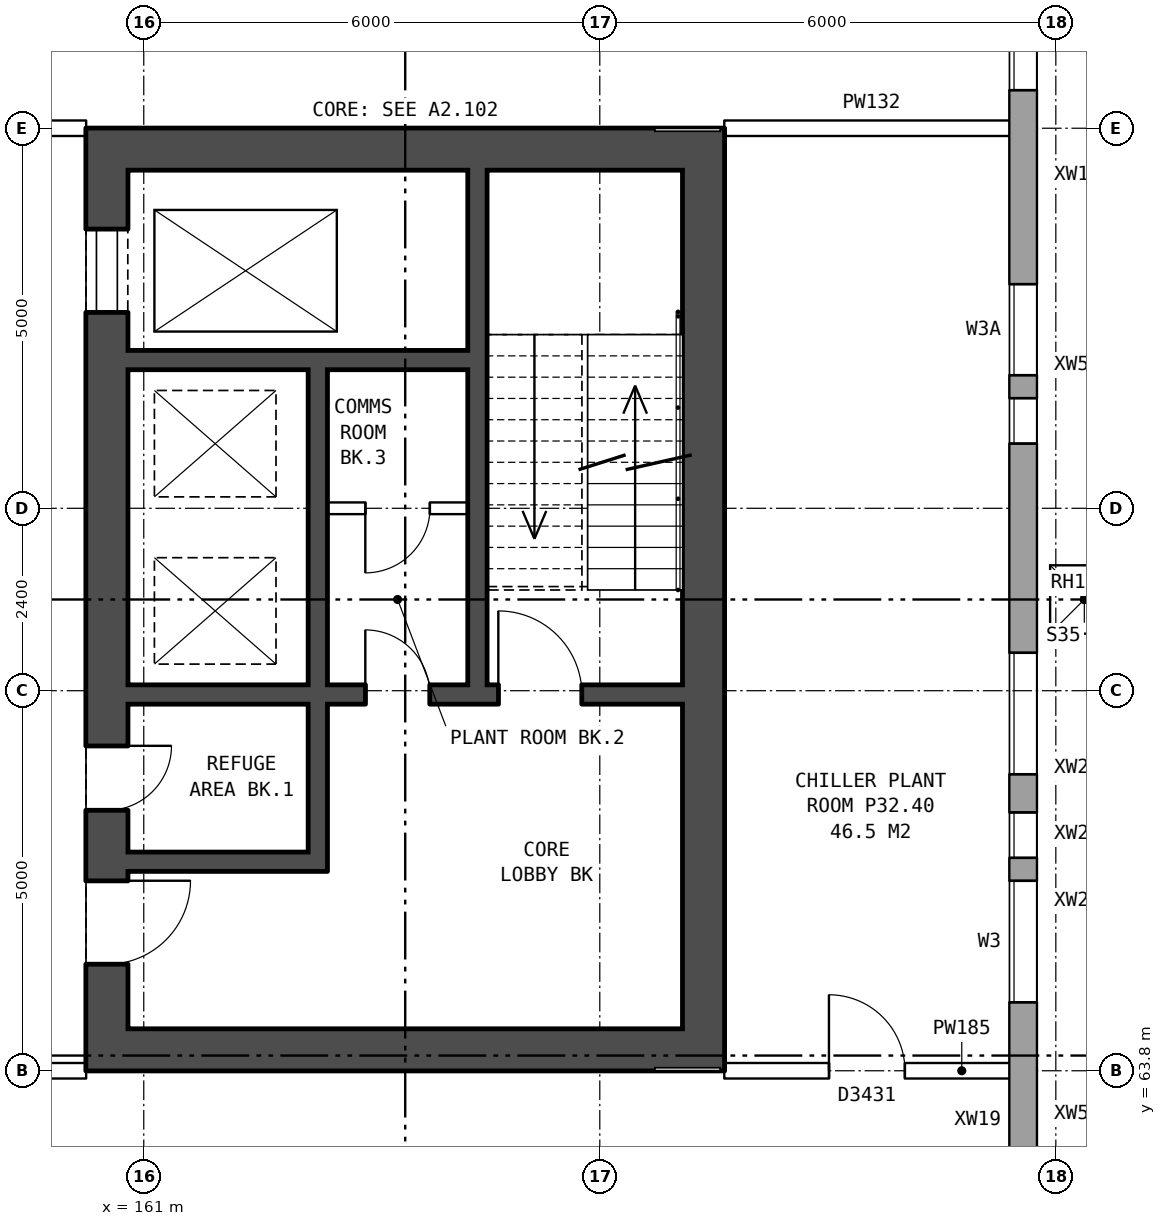
"""IFC4 building model, lengths in metres.
Left out: names, types, materials, properties, quantities, classifications, styles, units other than length and angle.
Written with IfcOpenShell. Run it as: python <this file> out.ifc"""

import sys

from ifc_helpers import new_model, si_unit, direction, frame, frame_2d, origin, origin_2d, place, context, subcontext, project, spatial, rectangle, extrude, element, fill, save


model = new_model("IFC4")
c1 = context("Model", 3, precision=1e-05, world=origin(), true_north=direction((0.0, 1.0)))
c2 = subcontext(c1, "Body", "Model", "MODEL_VIEW")
j1 = project(units=[si_unit("LENGTHUNIT", "METRE"), si_unit("PLANEANGLEUNIT", "RADIAN")], contexts=[c1])
p1 = place(None, origin())
s1 = spatial("IfcSite", under=j1, at=p1, CompositionType="ELEMENT")
p2 = place(p1, origin())
s2 = spatial("IfcBuilding", under=s1, at=p2, CompositionType="ELEMENT")
p3 = place(p2, frame((0.0, 0.0, 115.0)))
s3 = spatial("IfcBuildingStorey", under=s2, at=p3, CompositionType="ELEMENT", Elevation=115.0)
p4 = place(p3, frame((172.57, 57.075, 0.0), z_axis=(0.0, 0.0, 1.0), x_axis=(0.0, 1.0, 0.0)))
e1 = element("IfcWall", 1, at=p4, inside=s3, PredefinedType="STANDARD", context=c2, shape_type="SweptSolid", body=[
    extrude(rectangle(XDim=25.851, YDim=0.36, at=frame_2d((12.925, 0.0))), origin(), (0.0, 0.0, 1.0), 4.2),
])
p5 = place(p4, frame((2.6, 0.0, 1.5)))
e2 = element("IfcOpeningElement", 2, at=p5, cuts=e1, PredefinedType="OPENING", context=c2, shape_type="SweptSolid", body=[
    extrude(rectangle(XDim=0.9, YDim=1.2, at=frame_2d((0.45, 0.6))), frame((0.0, 0.19, 0.0), z_axis=(0.0, -1.0, 0.0), x_axis=(1.0, 0.0, 0.0)), (0.0, 0.0, 1.0), 0.38),
])
p6 = place(p4, frame((3.925, 0.0, 1.5)))
e3 = element("IfcOpeningElement", 3, at=p6, cuts=e1, PredefinedType="OPENING", context=c2, shape_type="SweptSolid", body=[
    extrude(rectangle(XDim=0.6, YDim=1.2, at=frame_2d((0.3, 0.6))), frame((0.0, 0.19, 0.0), z_axis=(0.0, -1.0, 0.0), x_axis=(1.0, 0.0, 0.0)), (0.0, 0.0, 1.0), 0.38),
])
p7 = place(p4, frame((7.625, 0.0, 1.5)))
e4 = element("IfcOpeningElement", 4, at=p7, cuts=e1, PredefinedType="OPENING", context=c2, shape_type="SweptSolid", body=[
    extrude(rectangle(XDim=1.6, YDim=1.2, at=frame_2d((0.8, 0.6))), frame((0.0, 0.19, 0.0), z_axis=(0.0, -1.0, 0.0), x_axis=(1.0, 0.0, 0.0)), (0.0, 0.0, 1.0), 0.38),
])
p8 = place(p4, frame((10.625, 0.0, 1.5)))
e5 = element("IfcOpeningElement", 5, at=p8, cuts=e1, PredefinedType="OPENING", context=c2, shape_type="SweptSolid", body=[
    extrude(rectangle(XDim=1.6, YDim=1.2, at=frame_2d((0.8, 0.6))), frame((0.0, 0.19, 0.0), z_axis=(0.0, -1.0, 0.0), x_axis=(1.0, 0.0, 0.0)), (0.0, 0.0, 1.0), 0.38),
])
p9 = place(p4, frame((9.525, 0.0, 1.5)))
e6 = element("IfcOpeningElement", 6, at=p9, cuts=e1, PredefinedType="OPENING", context=c2, shape_type="SweptSolid", body=[
    extrude(rectangle(XDim=0.6, YDim=1.2, at=frame_2d((0.3, 0.6))), frame((0.0, 0.19, 0.0), z_axis=(0.0, -1.0, 0.0), x_axis=(1.0, 0.0, 0.0)), (0.0, 0.0, 1.0), 0.38),
])
p10 = place(p4, frame((14.975, 0.0, 1.5)))
e7 = element("IfcOpeningElement", 7, at=p10, cuts=e1, PredefinedType="OPENING", context=c2, shape_type="SweptSolid", body=[
    extrude(rectangle(XDim=0.6, YDim=1.2, at=frame_2d((0.3, 0.6))), frame((0.0, 0.19, 0.0), z_axis=(0.0, -1.0, 0.0), x_axis=(1.0, 0.0, 0.0)), (0.0, 0.0, 1.0), 0.38),
])
p11 = place(p4, frame((19.625, 0.0, 1.5)))
e8 = element("IfcOpeningElement", 8, at=p11, cuts=e1, PredefinedType="OPENING", context=c2, shape_type="SweptSolid", body=[
    extrude(rectangle(XDim=1.6, YDim=1.2, at=frame_2d((0.8, 0.6))), frame((0.0, 0.19, 0.0), z_axis=(0.0, -1.0, 0.0), x_axis=(1.0, 0.0, 0.0)), (0.0, 0.0, 1.0), 0.38),
])
p12 = place(p4, frame((22.625, 0.0, 1.5)))
e9 = element("IfcOpeningElement", 9, at=p12, cuts=e1, PredefinedType="OPENING", context=c2, shape_type="SweptSolid", body=[
    extrude(rectangle(XDim=1.6, YDim=1.2, at=frame_2d((0.8, 0.6))), frame((0.0, 0.19, 0.0), z_axis=(0.0, -1.0, 0.0), x_axis=(1.0, 0.0, 0.0)), (0.0, 0.0, 1.0), 0.38),
])
p13 = place(p4, frame((15.875, 0.0, 1.5)))
e10 = element("IfcOpeningElement", 10, at=p13, cuts=e1, PredefinedType="OPENING", context=c2, shape_type="SweptSolid", body=[
    extrude(rectangle(XDim=1.2, YDim=1.2, at=frame_2d((0.6, 0.6))), frame((0.0, 0.19, 0.0), z_axis=(0.0, -1.0, 0.0), x_axis=(1.0, 0.0, 0.0)), (0.0, 0.0, 1.0), 0.38),
])
p14 = place(p3, frame((160.515, 76.2, 0.0), z_axis=(0.0, 0.0, 1.0), x_axis=(0.0, -1.0, 0.0)))
e11 = element("IfcWall", 11, at=p14, inside=s3, PredefinedType="SHEAR", context=c2, shape_type="SweptSolid", body=[
    extrude(rectangle(XDim=12.4, YDim=0.55, at=frame_2d((6.2, 0.0))), origin(), (0.0, 0.0, 1.0), 4.2),
])
p15 = place(p14, frame((1.325, 0.0, 0.0)))
e12 = element("IfcOpeningElement", 12, at=p15, cuts=e11, PredefinedType="OPENING", context=c2, shape_type="SweptSolid", body=[
    extrude(rectangle(XDim=1.1, YDim=2.1, at=frame_2d((0.55, 1.05))), frame((0.0, 0.285, 0.0), z_axis=(0.0, -1.0, 0.0), x_axis=(1.0, 0.0, 0.0)), (0.0, 0.0, 1.0), 0.57),
])
p16 = place(p14, frame((9.9, 0.0, 0.0)))
e13 = element("IfcOpeningElement", 13, at=p16, cuts=e11, PredefinedType="OPENING", context=c2, shape_type="SweptSolid", body=[
    extrude(rectangle(XDim=1.1, YDim=2.1, at=frame_2d((0.55, 1.05))), frame((0.0, 0.285, 0.0), z_axis=(0.0, -1.0, 0.0), x_axis=(1.0, 0.0, 0.0)), (0.0, 0.0, 1.0), 0.57),
])
p17 = place(p14, frame((8.125, 0.0, 0.0)))
e14 = element("IfcOpeningElement", 14, at=p17, cuts=e11, PredefinedType="OPENING", context=c2, shape_type="SweptSolid", body=[
    extrude(rectangle(XDim=0.85, YDim=2.1, at=frame_2d((0.425, 1.05))), frame((0.0, 0.285, 0.0), z_axis=(0.0, -1.0, 0.0), x_axis=(1.0, 0.0, 0.0)), (0.0, 0.0, 1.0), 0.57),
])
p18 = place(p3, frame((168.365, 76.2, 0.0), z_axis=(0.0, 0.0, 1.0), x_axis=(0.0, -1.0, 0.0)))
e15 = element("IfcWall", 15, at=p18, inside=s3, PredefinedType="SHEAR", context=c2, shape_type="SweptSolid", body=[
    extrude(rectangle(XDim=12.4, YDim=0.55, at=frame_2d((6.2, 0.0))), origin(), (0.0, 0.0, 1.0), 4.2),
])
for number, where, z_axis, x_axis in (
    (16, (160.79, 75.925, 0.0), (0.0, 0.0, 1.0), (1.0, 0.0, 0.0)),
    (17, (160.79, 64.075, 0.0), (0.0, 0.0, 1.0), (1.0, 0.0, 0.0)),
):
    element("IfcWall", number, at=place(p3, frame(where, z_axis=z_axis, x_axis=x_axis)), inside=s3, PredefinedType="SHEAR", context=c2, shape_type="SweptSolid", body=[
        extrude(rectangle(XDim=7.3, YDim=0.55, at=frame_2d((3.65, 0.0))), origin(), (0.0, 0.0, 1.0), 4.2),
    ])
p19 = place(p3, frame((160.79, 73.15, 0.0), z_axis=(0.0, 0.0, 1.0), x_axis=(1.0, 0.0, 0.0)))
e18 = element("IfcWall", 18, at=p19, inside=s3, PredefinedType="SHEAR", context=c2, shape_type="SweptSolid", body=[
    extrude(rectangle(XDim=4.475, YDim=0.25, at=frame_2d((2.237, 0.0))), origin(), (0.0, 0.0, 1.0), 4.2),
])
p20 = place(p3, frame((163.415, 71.2, 0.0), z_axis=(0.0, 0.0, 1.0), x_axis=(1.0, 0.0, 0.0)))
e19 = element("IfcWall", 19, at=p20, inside=s3, PredefinedType="PARTITIONING", context=c2, shape_type="SweptSolid", body=[
    extrude(rectangle(XDim=1.85, YDim=0.15, at=frame_2d((0.925, 0.0))), origin(), (0.0, 0.0, 1.0), 4.2),
])
p21 = place(p20, frame((0.5, 0.0, 0.0)))
e20 = element("IfcOpeningElement", 20, at=p21, cuts=e19, PredefinedType="OPENING", context=c2, shape_type="SweptSolid", body=[
    extrude(rectangle(XDim=0.85, YDim=2.1, at=frame_2d((0.425, 1.05))), frame((0.0, 0.085, 0.0), z_axis=(0.0, -1.0, 0.0), x_axis=(1.0, 0.0, 0.0)), (0.0, 0.0, 1.0), 0.17),
])
p22 = place(p3, frame((160.79, 68.75, 0.0), z_axis=(0.0, 0.0, 1.0), x_axis=(1.0, 0.0, 0.0)))
e21 = element("IfcWall", 21, at=p22, inside=s3, PredefinedType="SHEAR", context=c2, shape_type="SweptSolid", body=[
    extrude(rectangle(XDim=7.3, YDim=0.25, at=frame_2d((3.65, 0.0))), origin(), (0.0, 0.0, 1.0), 4.2),
])
p23 = place(p22, frame((4.875, 0.0, 0.0)))
e22 = element("IfcOpeningElement", 22, at=p23, cuts=e21, PredefinedType="OPENING", context=c2, shape_type="SweptSolid", body=[
    extrude(rectangle(XDim=1.1, YDim=2.1, at=frame_2d((0.55, 1.05))), frame((0.0, 0.135, 0.0), z_axis=(0.0, -1.0, 0.0), x_axis=(1.0, 0.0, 0.0)), (0.0, 0.0, 1.0), 0.27),
])
p24 = place(p22, frame((3.125, 0.0, 0.0)))
e23 = element("IfcOpeningElement", 23, at=p24, cuts=e21, PredefinedType="OPENING", context=c2, shape_type="SweptSolid", body=[
    extrude(rectangle(XDim=0.85, YDim=2.1, at=frame_2d((0.425, 1.05))), frame((0.0, 0.135, 0.0), z_axis=(0.0, -1.0, 0.0), x_axis=(1.0, 0.0, 0.0)), (0.0, 0.0, 1.0), 0.27),
])
p25 = place(p3, frame((160.79, 66.55, 0.0), z_axis=(0.0, 0.0, 1.0), x_axis=(1.0, 0.0, 0.0)))
e24 = element("IfcWall", 24, at=p25, inside=s3, PredefinedType="SHEAR", context=c2, shape_type="SweptSolid", body=[
    extrude(rectangle(XDim=2.375, YDim=0.25, at=frame_2d((1.188, 0.0))), origin(), (0.0, 0.0, 1.0), 4.2),
])
p26 = place(p3, frame((163.29, 73.025, 0.0), z_axis=(0.0, 0.0, 1.0), x_axis=(0.0, -1.0, 0.0)))
e25 = element("IfcWall", 25, at=p26, inside=s3, PredefinedType="SHEAR", context=c2, shape_type="SweptSolid", body=[
    extrude(rectangle(XDim=4.15, YDim=0.25, at=frame_2d((2.075, 0.0))), origin(), (0.0, 0.0, 1.0), 4.2),
])
p27 = place(p3, frame((163.29, 68.625, 0.0), z_axis=(0.0, 0.0, 1.0), x_axis=(0.0, -1.0, 0.0)))
e26 = element("IfcWall", 26, at=p27, inside=s3, PredefinedType="SHEAR", context=c2, shape_type="SweptSolid", body=[
    extrude(rectangle(XDim=2.2, YDim=0.25, at=frame_2d((1.1, 0.0))), origin(), (0.0, 0.0, 1.0), 4.2),
])
p28 = place(p3, frame((165.39, 75.65, 0.0), z_axis=(0.0, 0.0, 1.0), x_axis=(0.0, -1.0, 0.0)))
e27 = element("IfcWall", 27, at=p28, inside=s3, PredefinedType="SHEAR", context=c2, shape_type="SweptSolid", body=[
    extrude(rectangle(XDim=6.775, YDim=0.25, at=frame_2d((3.387, 0.0))), origin(), (0.0, 0.0, 1.0), 4.2),
])
p29 = place(p3, frame((168.64, 63.8, 0.0), z_axis=(0.0, 0.0, 1.0), x_axis=(1.0, 0.0, 0.0)))
e28 = element("IfcWall", 28, at=p29, inside=s3, PredefinedType="PARTITIONING", context=c2, shape_type="SweptSolid", body=[
    extrude(rectangle(XDim=3.87, YDim=0.2, at=frame_2d((1.935, 0.0))), origin(), (0.0, 0.0, 1.0), 4.2),
])
p30 = place(p29, frame((1.375, 0.0, 0.0)))
e29 = element("IfcOpeningElement", 29, at=p30, cuts=e28, PredefinedType="OPENING", context=c2, shape_type="SweptSolid", body=[
    extrude(rectangle(XDim=1.0, YDim=2.1, at=frame_2d((0.5, 1.05))), frame((0.0, 0.11, 0.0), z_axis=(0.0, -1.0, 0.0), x_axis=(1.0, 0.0, 0.0)), (0.0, 0.0, 1.0), 0.22),
])
p31 = place(p3, frame((157.14, 63.8, 0.0), z_axis=(0.0, 0.0, 1.0), x_axis=(1.0, 0.0, 0.0)))
e30 = element("IfcWall", 30, at=p31, inside=s3, PredefinedType="PARTITIONING", context=c2, shape_type="SweptSolid", body=[
    extrude(rectangle(XDim=3.1, YDim=0.2, at=frame_2d((1.55, 0.0))), origin(), (0.0, 0.0, 1.0), 4.2),
])
p32 = place(p31, frame((1.1, 0.0, 0.0)))
e31 = element("IfcOpeningElement", 31, at=p32, cuts=e30, PredefinedType="OPENING", context=c2, shape_type="SweptSolid", body=[
    extrude(rectangle(XDim=1.0, YDim=2.1, at=frame_2d((0.5, 1.05))), frame((0.0, 0.11, 0.0), z_axis=(0.0, -1.0, 0.0), x_axis=(1.0, 0.0, 0.0)), (0.0, 0.0, 1.0), 0.22),
])
p33 = place(p3, frame((168.64, 76.2, 0.0), z_axis=(0.0, 0.0, 1.0), x_axis=(1.0, 0.0, 0.0)))
e32 = element("IfcWall", 32, at=p33, inside=s3, PredefinedType="PARTITIONING", context=c2, shape_type="SweptSolid", body=[
    extrude(rectangle(XDim=3.87, YDim=0.2, at=frame_2d((1.935, 0.0))), origin(), (0.0, 0.0, 1.0), 4.2),
])
p34 = place(p3, frame((157.14, 76.2, 0.0), z_axis=(0.0, 0.0, 1.0), x_axis=(1.0, 0.0, 0.0)))
e33 = element("IfcWall", 33, at=p34, inside=s3, PredefinedType="PARTITIONING", context=c2, shape_type="SweptSolid", body=[
    extrude(rectangle(XDim=3.1, YDim=0.2, at=frame_2d((1.55, 0.0))), origin(), (0.0, 0.0, 1.0), 4.2),
])
p35 = place(p34, frame((1.1, 0.0, 0.0)))
e34 = element("IfcOpeningElement", 34, at=p35, cuts=e33, PredefinedType="OPENING", context=c2, shape_type="SweptSolid", body=[
    extrude(rectangle(XDim=1.0, YDim=2.1, at=frame_2d((0.5, 1.05))), frame((0.0, 0.11, 0.0), z_axis=(0.0, -1.0, 0.0), x_axis=(1.0, 0.0, 0.0)), (0.0, 0.0, 1.0), 0.22),
])
p36 = place(p7, origin())
e35 = element("IfcWindow", 35, at=p36, inside=s3, PartitioningType="DOUBLE_PANEL_HORIZONTAL", PredefinedType="WINDOW", context=c2, shape_type="SweptSolid", body=[
    extrude(rectangle(XDim=1.6, YDim=1.2, at=frame_2d((0.8, 0.6))), frame((0.0, 0.15, 0.0), z_axis=(0.0, -1.0, 0.0), x_axis=(1.0, 0.0, 0.0)), (0.0, 0.0, 1.0), 0.06),
])
fill(e4, e35)
p37 = place(p8, origin())
e36 = element("IfcWindow", 36, at=p37, inside=s3, PartitioningType="DOUBLE_PANEL_HORIZONTAL", PredefinedType="WINDOW", context=c2, shape_type="SweptSolid", body=[
    extrude(rectangle(XDim=1.6, YDim=1.2, at=frame_2d((0.8, 0.6))), frame((0.0, 0.15, 0.0), z_axis=(0.0, -1.0, 0.0), x_axis=(1.0, 0.0, 0.0)), (0.0, 0.0, 1.0), 0.06),
])
fill(e5, e36)
p38 = place(p9, origin())
e37 = element("IfcWindow", 37, at=p38, inside=s3, PartitioningType="DOUBLE_PANEL_HORIZONTAL", PredefinedType="WINDOW", context=c2, shape_type="SweptSolid", body=[
    extrude(rectangle(XDim=0.6, YDim=1.2, at=frame_2d((0.3, 0.6))), frame((0.0, 0.15, 0.0), z_axis=(0.0, -1.0, 0.0), x_axis=(1.0, 0.0, 0.0)), (0.0, 0.0, 1.0), 0.06),
])
fill(e6, e37)
p39 = place(p10, origin())
e38 = element("IfcWindow", 38, at=p39, inside=s3, PartitioningType="DOUBLE_PANEL_HORIZONTAL", PredefinedType="WINDOW", context=c2, shape_type="SweptSolid", body=[
    extrude(rectangle(XDim=0.6, YDim=1.2, at=frame_2d((0.3, 0.6))), frame((0.0, 0.15, 0.0), z_axis=(0.0, -1.0, 0.0), x_axis=(1.0, 0.0, 0.0)), (0.0, 0.0, 1.0), 0.06),
])
fill(e7, e38)
p40 = place(p11, origin())
e39 = element("IfcWindow", 39, at=p40, inside=s3, PartitioningType="DOUBLE_PANEL_HORIZONTAL", PredefinedType="WINDOW", context=c2, shape_type="SweptSolid", body=[
    extrude(rectangle(XDim=1.6, YDim=1.2, at=frame_2d((0.8, 0.6))), frame((0.0, 0.15, 0.0), z_axis=(0.0, -1.0, 0.0), x_axis=(1.0, 0.0, 0.0)), (0.0, 0.0, 1.0), 0.06),
])
fill(e8, e39)
p41 = place(p3, frame((0.0, 0.0, -0.25)))
p42 = place(p41, frame((173.375, 70.0, 0.0)))
p43 = place(p42, frame((0.0, 0.0, 0.2)))
e40 = element("IfcWindow", 40, at=p43, inside=s3, PartitioningType="SINGLE_PANEL", PredefinedType="SKYLIGHT", context=c2, shape_type="SweptSolid", body=[
    extrude(rectangle(XDim=0.9, YDim=0.9, at=origin_2d()), origin(), (0.0, 0.0, 1.0), 0.05),
])
p44 = place(p15, origin())
e41 = element("IfcDoor", 41, at=p44, inside=s3, OperationType="DOUBLE_DOOR_SLIDING", PredefinedType="DOOR", context=c2, shape_type="SweptSolid", body=[
    extrude(rectangle(XDim=1.1, YDim=2.1, at=frame_2d((0.55, 1.05))), frame((0.0, 0.26, 0.0), z_axis=(0.0, -1.0, 0.0), x_axis=(1.0, 0.0, 0.0)), (0.0, 0.0, 1.0), 0.05),
])
fill(e12, e41)
p45 = place(p16, origin())
e42 = element("IfcDoor", 42, at=p45, inside=s3, OperationType="SINGLE_SWING_LEFT", PredefinedType="DOOR", context=c2, shape_type="SweptSolid", body=[
    extrude(rectangle(XDim=1.1, YDim=2.1, at=frame_2d((0.55, 1.05))), frame((0.0, 0.26, 0.0), z_axis=(0.0, -1.0, 0.0), x_axis=(1.0, 0.0, 0.0)), (0.0, 0.0, 1.0), 0.05),
])
fill(e13, e42)
p46 = place(p23, origin())
e43 = element("IfcDoor", 43, at=p46, inside=s3, OperationType="SINGLE_SWING_LEFT", PredefinedType="DOOR", context=c2, shape_type="SweptSolid", body=[
    extrude(rectangle(XDim=1.1, YDim=2.1, at=frame_2d((0.55, 1.05))), frame((0.0, 0.025, 0.0), z_axis=(0.0, -1.0, 0.0), x_axis=(1.0, 0.0, 0.0)), (0.0, 0.0, 1.0), 0.05),
])
fill(e22, e43)
p47 = place(p17, origin())
e44 = element("IfcDoor", 44, at=p47, inside=s3, OperationType="SINGLE_SWING_LEFT", PredefinedType="DOOR", context=c2, shape_type="SweptSolid", body=[
    extrude(rectangle(XDim=0.85, YDim=2.1, at=frame_2d((0.425, 1.05))), frame((0.0, 0.26, 0.0), z_axis=(0.0, -1.0, 0.0), x_axis=(1.0, 0.0, 0.0)), (0.0, 0.0, 1.0), 0.05),
])
fill(e14, e44)
p48 = place(p24, origin())
e45 = element("IfcDoor", 45, at=p48, inside=s3, OperationType="SINGLE_SWING_LEFT", PredefinedType="DOOR", context=c2, shape_type="SweptSolid", body=[
    extrude(rectangle(XDim=0.85, YDim=2.1, at=frame_2d((0.425, 1.05))), frame((0.0, 0.025, 0.0), z_axis=(0.0, -1.0, 0.0), x_axis=(1.0, 0.0, 0.0)), (0.0, 0.0, 1.0), 0.05),
])
fill(e23, e45)
p49 = place(p21, frame((0.85, 0.0, 0.0), z_axis=(0.0, 0.0, 1.0), x_axis=(-1.0, 0.0, 0.0)))
e46 = element("IfcDoor", 46, at=p49, inside=s3, OperationType="SINGLE_SWING_RIGHT", PredefinedType="DOOR", context=c2, shape_type="SweptSolid", body=[
    extrude(rectangle(XDim=0.85, YDim=2.1, at=frame_2d((0.425, 1.05))), frame((0.0, 0.025, 0.0), z_axis=(0.0, -1.0, 0.0), x_axis=(1.0, 0.0, 0.0)), (0.0, 0.0, 1.0), 0.05),
])
fill(e20, e46)
p50 = place(p30, origin())
e47 = element("IfcDoor", 47, at=p50, inside=s3, OperationType="SINGLE_SWING_LEFT", PredefinedType="DOOR", context=c2, shape_type="SweptSolid", body=[
    extrude(rectangle(XDim=1.0, YDim=2.1, at=frame_2d((0.5, 1.05))), frame((0.0, 0.025, 0.0), z_axis=(0.0, -1.0, 0.0), x_axis=(1.0, 0.0, 0.0)), (0.0, 0.0, 1.0), 0.05),
])
fill(e29, e47)
p51 = place(p13, origin())
e48 = element("IfcWindow", 48, at=p51, inside=s3, PartitioningType="DOUBLE_PANEL_HORIZONTAL", PredefinedType="WINDOW", context=c2, shape_type="SweptSolid", body=[
    extrude(rectangle(XDim=1.2, YDim=1.2, at=frame_2d((0.6, 0.6))), frame((0.0, 0.15, 0.0), z_axis=(0.0, -1.0, 0.0), x_axis=(1.0, 0.0, 0.0)), (0.0, 0.0, 1.0), 0.06),
])
fill(e10, e48)
save(model, sys.argv[1])
